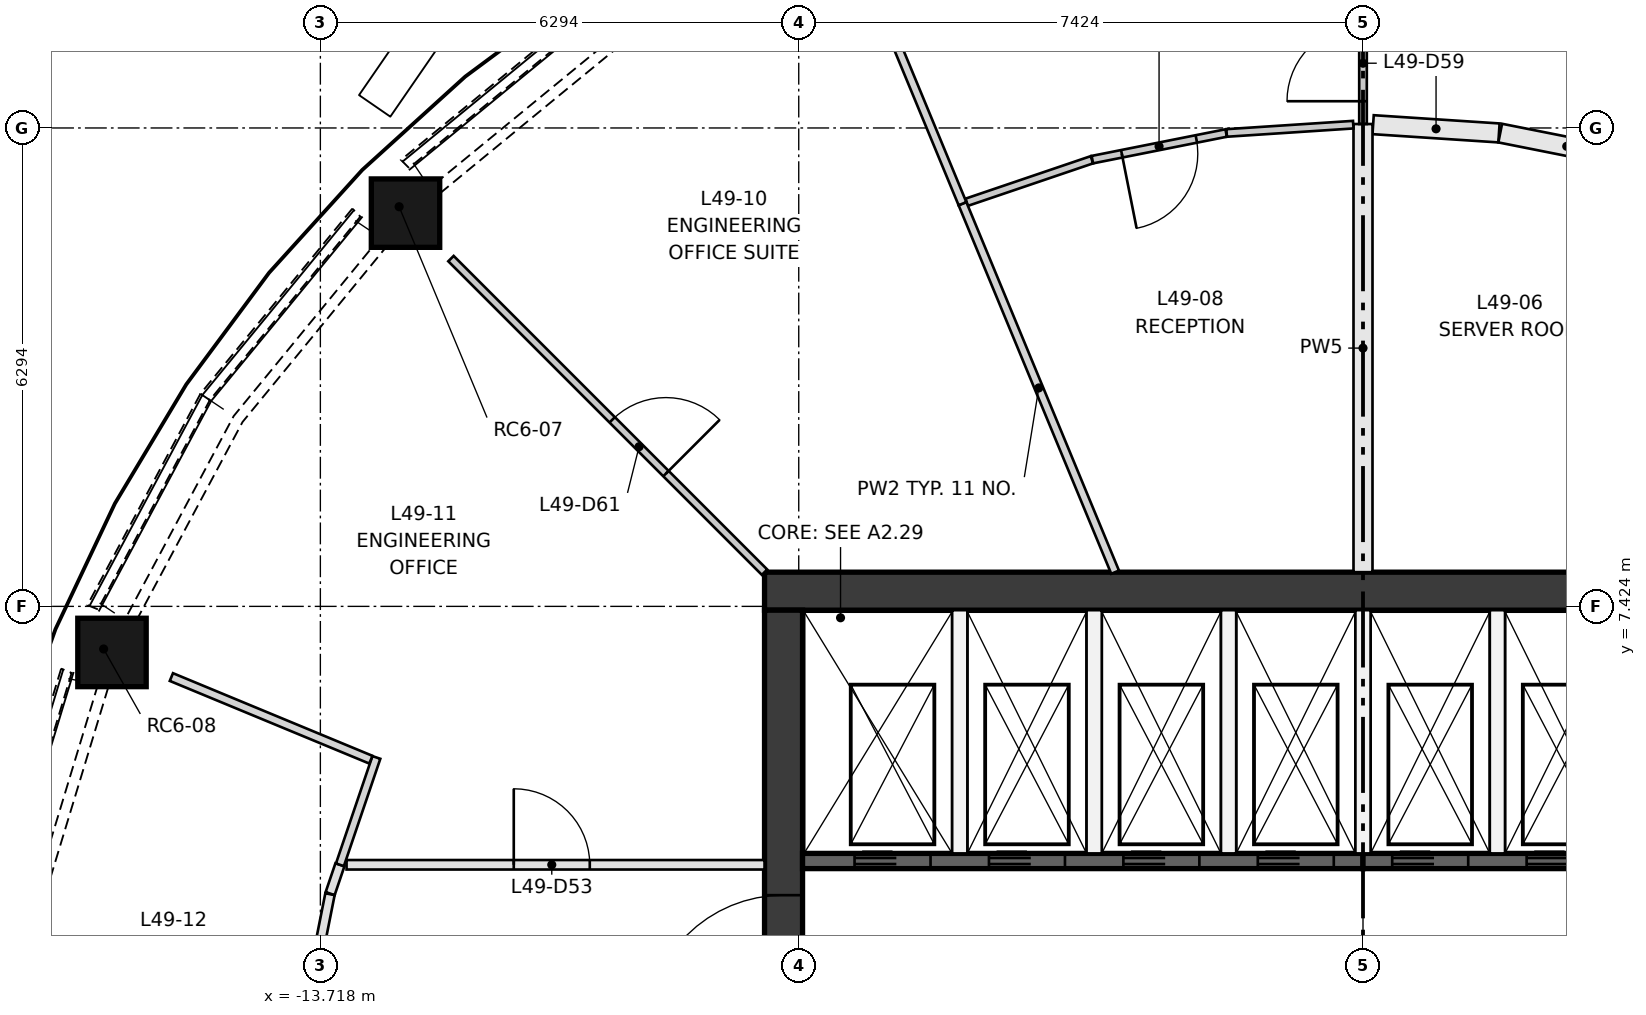
"""IFC4 building model, lengths in metres.
Left out: names, types, materials, properties, quantities, classifications, styles, units other than length and angle.
Written with IfcOpenShell. Run it as: python <this file> out.ifc"""

import sys

from ifc_helpers import new_model, si_unit, direction, frame, frame_2d, origin, origin_2d, place, context, subcontext, project, spatial, polyline, rectangle, outline, extrude, element, fill, save


model = new_model("IFC4")
c1 = context("Model", 3, precision=1e-05, world=origin(), true_north=direction((0.0, 1.0)))
c2 = subcontext(c1, "Body", "Model", "MODEL_VIEW")
j1 = project(units=[si_unit("LENGTHUNIT", "METRE"), si_unit("PLANEANGLEUNIT", "RADIAN")], contexts=[c1])
p1 = place(None, origin())
s1 = spatial("IfcSite", under=j1, at=p1, CompositionType="ELEMENT")
p2 = place(p1, origin())
s2 = spatial("IfcBuilding", under=s1, at=p2, CompositionType="ELEMENT")
p3 = place(p2, frame((0.0, 0.0, 184.3)))
s3 = spatial("IfcBuildingStorey", under=s2, at=p3, CompositionType="ELEMENT", Elevation=184.3)
p4 = place(p3, frame((-12.682, 12.682, 0.5), z_axis=(0.0, 0.0, 1.0), x_axis=(0.707106781187, 0.707106781187, 0.0)))
e1 = element("IfcColumn", 1, at=p4, inside=s3, PredefinedType="COLUMN", context=c2, shape_type="SweptSolid", body=[
    extrude(rectangle(XDim=0.9, YDim=0.9, at=origin_2d()), origin(), (0.0, -0.168, 0.986), 2.384),
])
p5 = place(p3, frame((-16.57, 6.863, 0.5), z_axis=(0.0, 0.0, 1.0), x_axis=(0.382100188932, 0.924120904221, 0.0)))
e2 = element("IfcColumn", 2, at=p5, inside=s3, PredefinedType="COLUMN", context=c2, shape_type="SweptSolid", body=[
    extrude(rectangle(XDim=0.9, YDim=0.9, at=origin_2d()), origin(), (0.0, -0.168, 0.986), 2.384),
])
p6 = place(p3, frame((-7.874, 7.624, 0.0), z_axis=(0.0, 0.0, 1.0), x_axis=(1.0, 0.0, 0.0)))
e3 = element("IfcWall", 3, at=p6, inside=s3, PredefinedType="SHEAR", context=c2, shape_type="SweptSolid", body=[
    extrude(rectangle(XDim=15.748, YDim=0.5, at=frame_2d((7.874, 0.0))), origin(), (0.0, 0.0, 1.0), 3.35),
])
p7 = place(p3, frame((-7.624, -7.374, 0.0), z_axis=(0.0, 0.0, 1.0), x_axis=(0.0, 1.0, 0.0)))
e4 = element("IfcWall", 4, at=p7, inside=s3, PredefinedType="SHEAR", context=c2, shape_type="SweptSolid", body=[
    extrude(rectangle(XDim=14.748, YDim=0.5, at=frame_2d((7.374, 0.0))), origin(), (0.0, 0.0, 1.0), 3.35),
])
p8 = place(p7, frame((6.874, 0.0, 0.0)))
e5 = element("IfcOpeningElement", 5, at=p8, cuts=e4, PredefinedType="OPENING", context=c2, shape_type="SweptSolid", body=[
    extrude(rectangle(XDim=1.0, YDim=2.1, at=frame_2d((0.5, 1.05))), frame((0.0, 0.26, 0.0), z_axis=(0.0, -1.0, 0.0), x_axis=(1.0, 0.0, 0.0)), (0.0, 0.0, 1.0), 0.52),
])
p9 = place(p7, frame((3.75, 0.0, 0.0)))
e6 = element("IfcOpeningElement", 6, at=p9, cuts=e4, PredefinedType="OPENING", context=c2, shape_type="SweptSolid", body=[
    extrude(rectangle(XDim=1.8, YDim=2.1, at=frame_2d((0.9, 1.05))), frame((0.0, 0.26, 0.0), z_axis=(0.0, -1.0, 0.0), x_axis=(1.0, 0.0, 0.0)), (0.0, 0.0, 1.0), 0.52),
])
p10 = place(p7, frame((9.198, 0.0, 0.0)))
e7 = element("IfcOpeningElement", 7, at=p10, cuts=e4, PredefinedType="OPENING", context=c2, shape_type="SweptSolid", body=[
    extrude(rectangle(XDim=1.8, YDim=2.1, at=frame_2d((0.9, 1.05))), frame((0.0, 0.26, 0.0), z_axis=(0.0, -1.0, 0.0), x_axis=(1.0, 0.0, 0.0)), (0.0, 0.0, 1.0), 0.52),
])
p11 = place(p3, frame((-7.374, 4.074, 0.0), z_axis=(0.0, 0.0, 1.0), x_axis=(1.0, 0.0, 0.0)))
e8 = element("IfcWall", 8, at=p11, inside=s3, PredefinedType="SHEAR", context=c2, shape_type="SweptSolid", body=[
    extrude(rectangle(XDim=7.374, YDim=0.2, at=frame_2d((3.687, 0.0))), origin(), (0.0, 0.0, 1.0), 3.0),
])
p12 = place(p11, frame((0.684, 0.0, 0.0)))
e9 = element("IfcOpeningElement", 9, at=p12, cuts=e8, PredefinedType="OPENING", context=c2, shape_type="SweptSolid", body=[
    extrude(rectangle(XDim=1.0, YDim=2.1, at=frame_2d((0.5, 1.05))), frame((0.0, 0.11, 0.0), z_axis=(0.0, -1.0, 0.0), x_axis=(1.0, 0.0, 0.0)), (0.0, 0.0, 1.0), 0.22),
])
p13 = place(p11, frame((2.453, 0.0, 0.0)))
e10 = element("IfcOpeningElement", 10, at=p13, cuts=e8, PredefinedType="OPENING", context=c2, shape_type="SweptSolid", body=[
    extrude(rectangle(XDim=1.0, YDim=2.1, at=frame_2d((0.5, 1.05))), frame((0.0, 0.11, 0.0), z_axis=(0.0, -1.0, 0.0), x_axis=(1.0, 0.0, 0.0)), (0.0, 0.0, 1.0), 0.22),
])
p14 = place(p11, frame((4.221, 0.0, 0.0)))
e11 = element("IfcOpeningElement", 11, at=p14, cuts=e8, PredefinedType="OPENING", context=c2, shape_type="SweptSolid", body=[
    extrude(rectangle(XDim=1.0, YDim=2.1, at=frame_2d((0.5, 1.05))), frame((0.0, 0.11, 0.0), z_axis=(0.0, -1.0, 0.0), x_axis=(1.0, 0.0, 0.0)), (0.0, 0.0, 1.0), 0.22),
])
p15 = place(p11, frame((5.99, 0.0, 0.0)))
e12 = element("IfcOpeningElement", 12, at=p15, cuts=e8, PredefinedType="OPENING", context=c2, shape_type="SweptSolid", body=[
    extrude(rectangle(XDim=1.0, YDim=2.1, at=frame_2d((0.5, 1.05))), frame((0.0, 0.11, 0.0), z_axis=(0.0, -1.0, 0.0), x_axis=(1.0, 0.0, 0.0)), (0.0, 0.0, 1.0), 0.22),
])
p16 = place(p3, frame((0.0, 4.074, 0.0), z_axis=(0.0, 0.0, 1.0), x_axis=(1.0, 0.0, 0.0)))
e13 = element("IfcWall", 13, at=p16, inside=s3, PredefinedType="SHEAR", context=c2, shape_type="SweptSolid", body=[
    extrude(rectangle(XDim=7.374, YDim=0.2, at=frame_2d((3.687, 0.0))), origin(), (0.0, 0.0, 1.0), 3.0),
])
p17 = place(p16, frame((0.384, 0.0, 0.0)))
e14 = element("IfcOpeningElement", 14, at=p17, cuts=e13, PredefinedType="OPENING", context=c2, shape_type="SweptSolid", body=[
    extrude(rectangle(XDim=1.0, YDim=2.1, at=frame_2d((0.5, 1.05))), frame((0.0, 0.11, 0.0), z_axis=(0.0, -1.0, 0.0), x_axis=(1.0, 0.0, 0.0)), (0.0, 0.0, 1.0), 0.22),
])
p18 = place(p16, frame((2.153, 0.0, 0.0)))
e15 = element("IfcOpeningElement", 15, at=p18, cuts=e13, PredefinedType="OPENING", context=c2, shape_type="SweptSolid", body=[
    extrude(rectangle(XDim=1.0, YDim=2.1, at=frame_2d((0.5, 1.05))), frame((0.0, 0.11, 0.0), z_axis=(0.0, -1.0, 0.0), x_axis=(1.0, 0.0, 0.0)), (0.0, 0.0, 1.0), 0.22),
])
p19 = place(p16, frame((3.921, 0.0, 0.0)))
e16 = element("IfcOpeningElement", 16, at=p19, cuts=e13, PredefinedType="OPENING", context=c2, shape_type="SweptSolid", body=[
    extrude(rectangle(XDim=1.0, YDim=2.1, at=frame_2d((0.5, 1.05))), frame((0.0, 0.11, 0.0), z_axis=(0.0, -1.0, 0.0), x_axis=(1.0, 0.0, 0.0)), (0.0, 0.0, 1.0), 0.22),
])
p20 = place(p16, frame((5.79, 0.0, 0.0)))
e17 = element("IfcOpeningElement", 17, at=p20, cuts=e13, PredefinedType="OPENING", context=c2, shape_type="SweptSolid", body=[
    extrude(rectangle(XDim=0.8, YDim=2.1, at=frame_2d((0.4, 1.05))), frame((0.0, 0.11, 0.0), z_axis=(0.0, -1.0, 0.0), x_axis=(1.0, 0.0, 0.0)), (0.0, 0.0, 1.0), 0.22),
])
for number, where, z_axis, x_axis in (
    (18, (-5.305, 4.174, 0.0), (0.0, 0.0, 1.0), (0.0, 1.0, 0.0)),
    (19, (-3.537, 4.174, 0.0), (0.0, 0.0, 1.0), (0.0, 1.0, 0.0)),
    (20, (-1.769, 4.174, 0.0), (0.0, 0.0, 1.0), (0.0, 1.0, 0.0)),
    (21, (0.0, 4.174, 0.0), (0.0, 0.0, 1.0), (0.0, 1.0, 0.0)),
    (22, (1.769, 4.174, 0.0), (0.0, 0.0, 1.0), (0.0, 1.0, 0.0)),
):
    element("IfcWall", number, at=place(p3, frame(where, z_axis=z_axis, x_axis=x_axis)), inside=s3, PredefinedType="PARTITIONING", context=c2, shape_type="SweptSolid", body=[
        extrude(rectangle(XDim=3.2, YDim=0.2, at=frame_2d((1.6, 0.0))), origin(), (0.0, 0.0, 1.0), 3.0),
    ])
p21 = place(p3, frame((-10.221, 15.296, 0.0), z_axis=(-0.625791219471, 0.762829436571, 0.162716318582), x_axis=(-0.773132385109, -0.634244680745, 6.479811e-06)))
e23 = element("IfcWall", 23, at=p21, inside=s3, PredefinedType="SOLIDWALL", context=c2, shape_type="SweptSolid", body=[
    extrude(outline(polyline([(0.0, 0.0), (3.151, 0.0), (3.137, 0.912), (0.014, 0.912), (0.0, 0.0)])), origin(), (0.0, 0.0, -1.0), 0.3),
])
p22 = place(p3, frame((-13.297, 12.657, 0.0), z_axis=(-0.762803450932, 0.625801401555, 0.162798959018), x_axis=(-0.634263258583, -0.773117144297, -2.518315e-06)))
e24 = element("IfcWall", 24, at=p22, inside=s3, PredefinedType="SOLIDWALL", context=c2, shape_type="SweptSolid", body=[
    extrude(outline(polyline([(0.0, 0.0), (3.151, 5.551e-17), (3.137, 0.912), (0.015, 0.912), (0.0, 0.0)])), origin(), (0.0, 0.0, -1.0), 0.3),
])
p23 = place(p3, frame((-15.296, 10.221, 0.0), z_axis=(-0.870053087177, 0.465338838382, 0.162688017342), x_axis=(-0.471621015005, -0.881801348468, 6.731272e-06)))
e25 = element("IfcWall", 25, at=p23, inside=s3, PredefinedType="SOLIDWALL", context=c2, shape_type="SweptSolid", body=[
    extrude(outline(polyline([(0.0, 0.0), (3.152, -2.776e-17), (3.137, 0.912), (0.015, 0.912), (0.0, 0.0)])), origin(), (0.0, 0.0, -1.0), 0.3),
])
p24 = place(p3, frame((-17.128, 6.605, 0.0), z_axis=(-0.94416395345, 0.286447724297, 0.162794748846), x_axis=(-0.290320348038, -0.956929514391, 1.683956e-06)))
e26 = element("IfcWall", 26, at=p24, inside=s3, PredefinedType="SOLIDWALL", context=c2, shape_type="SweptSolid", body=[
    extrude(outline(polyline([(0.0, 0.0), (3.151, 0.0), (3.137, 0.912), (0.014, 0.912), (0.0, 0.0)])), origin(), (0.0, 0.0, -1.0), 0.3),
])
p25 = place(p3, frame((-13.373, 4.024, 0.0), z_axis=(0.0, 0.0, 1.0), x_axis=(1.0, 0.0, 0.0)))
e27 = element("IfcWall", 27, at=p25, inside=s3, PredefinedType="PARTITIONING", context=c2, shape_type="SweptSolid", body=[
    extrude(rectangle(XDim=5.499, YDim=0.125, at=frame_2d((2.75, 0.0))), origin(), (0.0, 0.0, 1.0), 3.0),
])
p26 = place(p25, frame((2.2, 0.0, 0.0)))
e28 = element("IfcOpeningElement", 28, at=p26, cuts=e27, PredefinedType="OPENING", context=c2, shape_type="SweptSolid", body=[
    extrude(rectangle(XDim=1.0, YDim=2.1, at=frame_2d((0.5, 1.05))), frame((0.0, 0.073, 0.0), z_axis=(0.0, -1.0, 0.0), x_axis=(1.0, 0.0, 0.0)), (0.0, 0.0, 1.0), 0.145),
])
p27 = place(p3, frame((-13.949, 1.841, 0.0), z_axis=(0.0, 0.0, 1.0), x_axis=(0.195065465094, 0.980790224425, 0.0)))
e29 = element("IfcWall", 29, at=p27, inside=s3, PredefinedType="PARTITIONING", context=c2, shape_type="SweptSolid", body=[
    extrude(rectangle(XDim=1.832, YDim=0.125, at=frame_2d((0.916, 0.0))), origin(), (0.0, 0.0, 1.0), 3.0),
])
p28 = place(p3, frame((-13.589, 3.646, 0.0), z_axis=(0.0, 0.0, 1.0), x_axis=(0.321530820204, 0.94689911377, 0.0)))
e30 = element("IfcWall", 30, at=p28, inside=s3, PredefinedType="PARTITIONING", context=c2, shape_type="SweptSolid", body=[
    extrude(rectangle(XDim=0.4, YDim=0.125, at=frame_2d((0.2, 0.0))), origin(), (0.0, 0.0, 1.0), 3.0),
])
p29 = place(p3, frame((0.133, 13.761, 0.0), z_axis=(0.0, 0.0, 1.0), x_axis=(0.997854270927, -0.065474071153, 0.0)))
e31 = element("IfcWall", 31, at=p29, inside=s3, PredefinedType="PARTITIONING", context=c2, shape_type="SweptSolid", body=[
    extrude(rectangle(XDim=1.659, YDim=0.25, at=frame_2d((0.83, 0.0))), origin(), (0.0, 0.0, 1.0), 3.0),
])
p30 = place(p3, frame((1.805, 13.651, 0.0), z_axis=(0.0, 0.0, 1.0), x_axis=(0.980790558622, -0.195063784741, 0.0)))
e32 = element("IfcWall", 32, at=p30, inside=s3, PredefinedType="PARTITIONING", context=c2, shape_type="SweptSolid", body=[
    extrude(rectangle(XDim=1.785, YDim=0.25, at=frame_2d((0.892, 0.0))), origin(), (0.0, 0.0, 1.0), 3.0),
])
p31 = place(p3, frame((0.0, 7.874, 0.0), z_axis=(0.0, 0.0, 1.0), x_axis=(0.0, 1.0, 0.0)))
e33 = element("IfcWall", 33, at=p31, inside=s3, PredefinedType="PARTITIONING", context=c2, shape_type="SweptSolid", body=[
    extrude(rectangle(XDim=5.896, YDim=0.25, at=frame_2d((2.948, 0.0))), origin(), (0.0, 0.0, 1.0), 3.0),
])
p32 = place(p3, frame((0.0, 13.77, 0.0), z_axis=(0.0, 0.0, 1.0), x_axis=(0.0, 1.0, 0.0)))
e34 = element("IfcWall", 34, at=p32, inside=s3, PredefinedType="PARTITIONING", context=c2, shape_type="SweptSolid", body=[
    extrude(rectangle(XDim=3.2, YDim=0.1, at=frame_2d((1.6, 0.0))), origin(), (0.0, 0.0, 1.0), 3.0),
])
p33 = place(p32, frame((0.3, 0.0, 0.0)))
e35 = element("IfcOpeningElement", 35, at=p33, cuts=e34, PredefinedType="OPENING", context=c2, shape_type="SweptSolid", body=[
    extrude(rectangle(XDim=1.0, YDim=2.1, at=frame_2d((0.5, 1.05))), frame((0.0, 0.06, 0.0), z_axis=(0.0, -1.0, 0.0), x_axis=(1.0, 0.0, 0.0)), (0.0, 0.0, 1.0), 0.12),
])
p34 = place(p3, frame((-5.214, 12.74, 0.0), z_axis=(0.0, 0.0, 1.0), x_axis=(0.946914638305, 0.321485097267, 0.0)))
e36 = element("IfcWall", 36, at=p34, inside=s3, PredefinedType="PARTITIONING", context=c2, shape_type="SweptSolid", body=[
    extrude(rectangle(XDim=1.74, YDim=0.1, at=frame_2d((0.87, 0.0))), origin(), (0.0, 0.0, 1.0), 3.0),
])
p35 = place(p3, frame((-1.801, 13.652, 0.0), z_axis=(0.0, 0.0, 1.0), x_axis=(-0.980789397091, -0.195069624886, 0.0)))
e37 = element("IfcWall", 37, at=p35, inside=s3, PredefinedType="PARTITIONING", context=c2, shape_type="SweptSolid", body=[
    extrude(rectangle(XDim=1.795, YDim=0.1, at=frame_2d((0.897, 0.0))), origin(), (0.0, 0.0, 1.0), 3.0),
])
p36 = place(p35, frame((0.4, 0.0, 0.0)))
e38 = element("IfcOpeningElement", 38, at=p36, cuts=e37, PredefinedType="OPENING", context=c2, shape_type="SweptSolid", body=[
    extrude(rectangle(XDim=1.0, YDim=2.1, at=frame_2d((0.5, 1.05))), frame((0.0, 0.06, 0.0), z_axis=(0.0, -1.0, 0.0), x_axis=(1.0, 0.0, 0.0)), (0.0, 0.0, 1.0), 0.12),
])
p37 = place(p3, frame((-1.794, 13.652, 0.0), z_axis=(0.0, 0.0, 1.0), x_axis=(0.997850681937, 0.065528746043, 0.0)))
e39 = element("IfcWall", 39, at=p37, inside=s3, PredefinedType="PARTITIONING", context=c2, shape_type="SweptSolid", body=[
    extrude(rectangle(XDim=1.669, YDim=0.1, at=frame_2d((0.834, 0.0))), origin(), (0.0, 0.0, 1.0), 3.0),
])
p38 = place(p3, frame((-3.261, 7.874, 0.0), z_axis=(0.0, 0.0, 1.0), x_axis=(-0.382698345407, 0.923873355186, 0.0)))
e40 = element("IfcWall", 40, at=p38, inside=s3, PredefinedType="PARTITIONING", context=c2, shape_type="SweptSolid", body=[
    extrude(rectangle(XDim=5.247, YDim=0.11, at=frame_2d((2.624, 0.0))), origin(), (0.0, 0.0, 1.0), 3.0),
])
p39 = place(p3, frame((-5.27, 12.722, 0.0), z_axis=(0.0, 0.0, 1.0), x_axis=(-0.382675211785, 0.923882937544, 0.0)))
e41 = element("IfcWall", 41, at=p39, inside=s3, PredefinedType="PARTITIONING", context=c2, shape_type="SweptSolid", body=[
    extrude(rectangle(XDim=3.2, YDim=0.11, at=frame_2d((1.6, 0.0))), origin(), (0.0, 0.0, 1.0), 3.0),
])
p40 = place(p3, frame((-12.0, 12.0, 0.0), z_axis=(0.0, 0.0, 1.0), x_axis=(0.707106781187, -0.707106781187, 0.0)))
e42 = element("IfcWall", 42, at=p40, inside=s3, PredefinedType="PARTITIONING", context=c2, shape_type="SweptSolid", body=[
    extrude(rectangle(XDim=5.834, YDim=0.1, at=frame_2d((2.917, 0.0))), origin(), (0.0, 0.0, 1.0), 3.0),
])
p41 = place(p40, frame((3.0, 0.0, 0.0)))
e43 = element("IfcOpeningElement", 43, at=p41, cuts=e42, PredefinedType="OPENING", context=c2, shape_type="SweptSolid", body=[
    extrude(rectangle(XDim=1.0, YDim=2.1, at=frame_2d((0.5, 1.05))), frame((0.0, 0.06, 0.0), z_axis=(0.0, -1.0, 0.0), x_axis=(1.0, 0.0, 0.0)), (0.0, 0.0, 1.0), 0.12),
])
p42 = place(p3, frame((-13.461, 4.024, 0.0), z_axis=(0.0, 0.0, 1.0), x_axis=(0.321527037068, 0.946900398371, 0.0)))
e44 = element("IfcWall", 44, at=p42, inside=s3, PredefinedType="PARTITIONING", context=c2, shape_type="SweptSolid", body=[
    extrude(rectangle(XDim=1.491, YDim=0.11, at=frame_2d((0.746, 0.0))), origin(), (0.0, 0.0, 1.0), 3.0),
])
p43 = place(p3, frame((-13.053, 5.407, 0.0), z_axis=(0.0, 0.0, 1.0), x_axis=(-0.923898495358, 0.382637648794, 0.0)))
e45 = element("IfcWall", 45, at=p43, inside=s3, PredefinedType="PARTITIONING", context=c2, shape_type="SweptSolid", body=[
    extrude(rectangle(XDim=2.841, YDim=0.11, at=frame_2d((1.421, 0.0))), origin(), (0.0, 0.0, 1.0), 3.0),
])
p44 = place(p12, frame((1.0, 0.0, 0.0), z_axis=(0.0, 0.0, 1.0), x_axis=(-1.0, 0.0, 0.0)))
e46 = element("IfcDoor", 46, at=p44, inside=s3, OperationType="DOUBLE_DOOR_SLIDING", PredefinedType="DOOR", context=c2, shape_type="SweptSolid", body=[
    extrude(rectangle(XDim=1.0, YDim=2.1, at=frame_2d((0.5, 1.05))), frame((0.0, 0.025, 0.0), z_axis=(0.0, -1.0, 0.0), x_axis=(1.0, 0.0, 0.0)), (0.0, 0.0, 1.0), 0.05),
])
fill(e9, e46)
p45 = place(p13, frame((1.0, 0.0, 0.0), z_axis=(0.0, 0.0, 1.0), x_axis=(-1.0, 0.0, 0.0)))
e47 = element("IfcDoor", 47, at=p45, inside=s3, OperationType="DOUBLE_DOOR_SLIDING", PredefinedType="DOOR", context=c2, shape_type="SweptSolid", body=[
    extrude(rectangle(XDim=1.0, YDim=2.1, at=frame_2d((0.5, 1.05))), frame((0.0, 0.025, 0.0), z_axis=(0.0, -1.0, 0.0), x_axis=(1.0, 0.0, 0.0)), (0.0, 0.0, 1.0), 0.05),
])
fill(e10, e47)
p46 = place(p14, frame((1.0, 0.0, 0.0), z_axis=(0.0, 0.0, 1.0), x_axis=(-1.0, 0.0, 0.0)))
e48 = element("IfcDoor", 48, at=p46, inside=s3, OperationType="DOUBLE_DOOR_SLIDING", PredefinedType="DOOR", context=c2, shape_type="SweptSolid", body=[
    extrude(rectangle(XDim=1.0, YDim=2.1, at=frame_2d((0.5, 1.05))), frame((0.0, 0.025, 0.0), z_axis=(0.0, -1.0, 0.0), x_axis=(1.0, 0.0, 0.0)), (0.0, 0.0, 1.0), 0.05),
])
fill(e11, e48)
p47 = place(p15, frame((1.0, 0.0, 0.0), z_axis=(0.0, 0.0, 1.0), x_axis=(-1.0, 0.0, 0.0)))
e49 = element("IfcDoor", 49, at=p47, inside=s3, OperationType="DOUBLE_DOOR_SLIDING", PredefinedType="DOOR", context=c2, shape_type="SweptSolid", body=[
    extrude(rectangle(XDim=1.0, YDim=2.1, at=frame_2d((0.5, 1.05))), frame((0.0, 0.025, 0.0), z_axis=(0.0, -1.0, 0.0), x_axis=(1.0, 0.0, 0.0)), (0.0, 0.0, 1.0), 0.05),
])
fill(e12, e49)
p48 = place(p17, frame((1.0, 0.0, 0.0), z_axis=(0.0, 0.0, 1.0), x_axis=(-1.0, 0.0, 0.0)))
e50 = element("IfcDoor", 50, at=p48, inside=s3, OperationType="DOUBLE_DOOR_SLIDING", PredefinedType="DOOR", context=c2, shape_type="SweptSolid", body=[
    extrude(rectangle(XDim=1.0, YDim=2.1, at=frame_2d((0.5, 1.05))), frame((0.0, 0.025, 0.0), z_axis=(0.0, -1.0, 0.0), x_axis=(1.0, 0.0, 0.0)), (0.0, 0.0, 1.0), 0.05),
])
fill(e14, e50)
p49 = place(p18, frame((1.0, 0.0, 0.0), z_axis=(0.0, 0.0, 1.0), x_axis=(-1.0, 0.0, 0.0)))
e51 = element("IfcDoor", 51, at=p49, inside=s3, OperationType="DOUBLE_DOOR_SLIDING", PredefinedType="DOOR", context=c2, shape_type="SweptSolid", body=[
    extrude(rectangle(XDim=1.0, YDim=2.1, at=frame_2d((0.5, 1.05))), frame((0.0, 0.025, 0.0), z_axis=(0.0, -1.0, 0.0), x_axis=(1.0, 0.0, 0.0)), (0.0, 0.0, 1.0), 0.05),
])
fill(e15, e51)
p50 = place(p10, origin())
e52 = element("IfcDoor", 52, at=p50, inside=s3, OperationType="DOUBLE_DOOR_SINGLE_SWING", PredefinedType="DOOR", context=c2, shape_type="SweptSolid", body=[
    extrude(rectangle(XDim=1.8, YDim=2.1, at=frame_2d((0.9, 1.05))), frame((0.0, 0.025, 0.0), z_axis=(0.0, -1.0, 0.0), x_axis=(1.0, 0.0, 0.0)), (0.0, 0.0, 1.0), 0.05),
])
fill(e7, e52)
p51 = place(p26, origin())
e53 = element("IfcDoor", 53, at=p51, inside=s3, OperationType="SINGLE_SWING_LEFT", PredefinedType="DOOR", context=c2, shape_type="SweptSolid", body=[
    extrude(rectangle(XDim=1.0, YDim=2.1, at=frame_2d((0.5, 1.05))), frame((0.0, 0.025, 0.0), z_axis=(0.0, -1.0, 0.0), x_axis=(1.0, 0.0, 0.0)), (0.0, 0.0, 1.0), 0.05),
])
fill(e28, e53)
p52 = place(p33, origin())
e54 = element("IfcDoor", 54, at=p52, inside=s3, OperationType="SINGLE_SWING_LEFT", PredefinedType="DOOR", context=c2, shape_type="SweptSolid", body=[
    extrude(rectangle(XDim=1.0, YDim=2.1, at=frame_2d((0.5, 1.05))), frame((0.0, 0.025, 0.0), z_axis=(0.0, -1.0, 0.0), x_axis=(1.0, 0.0, 0.0)), (0.0, 0.0, 1.0), 0.05),
])
fill(e35, e54)
p53 = place(p36, origin())
e55 = element("IfcDoor", 55, at=p53, inside=s3, OperationType="SINGLE_SWING_RIGHT", PredefinedType="DOOR", context=c2, shape_type="SweptSolid", body=[
    extrude(rectangle(XDim=1.0, YDim=2.1, at=frame_2d((0.5, 1.05))), frame((0.0, 0.025, 0.0), z_axis=(0.0, -1.0, 0.0), x_axis=(1.0, 0.0, 0.0)), (0.0, 0.0, 1.0), 0.05),
])
fill(e38, e55)
p54 = place(p41, origin())
e56 = element("IfcDoor", 56, at=p54, inside=s3, OperationType="SINGLE_SWING_RIGHT", PredefinedType="DOOR", context=c2, shape_type="SweptSolid", body=[
    extrude(rectangle(XDim=1.0, YDim=2.1, at=frame_2d((0.5, 1.05))), frame((0.0, 0.025, 0.0), z_axis=(0.0, -1.0, 0.0), x_axis=(1.0, 0.0, 0.0)), (0.0, 0.0, 1.0), 0.05),
])
fill(e43, e56)
save(model, sys.argv[1])
